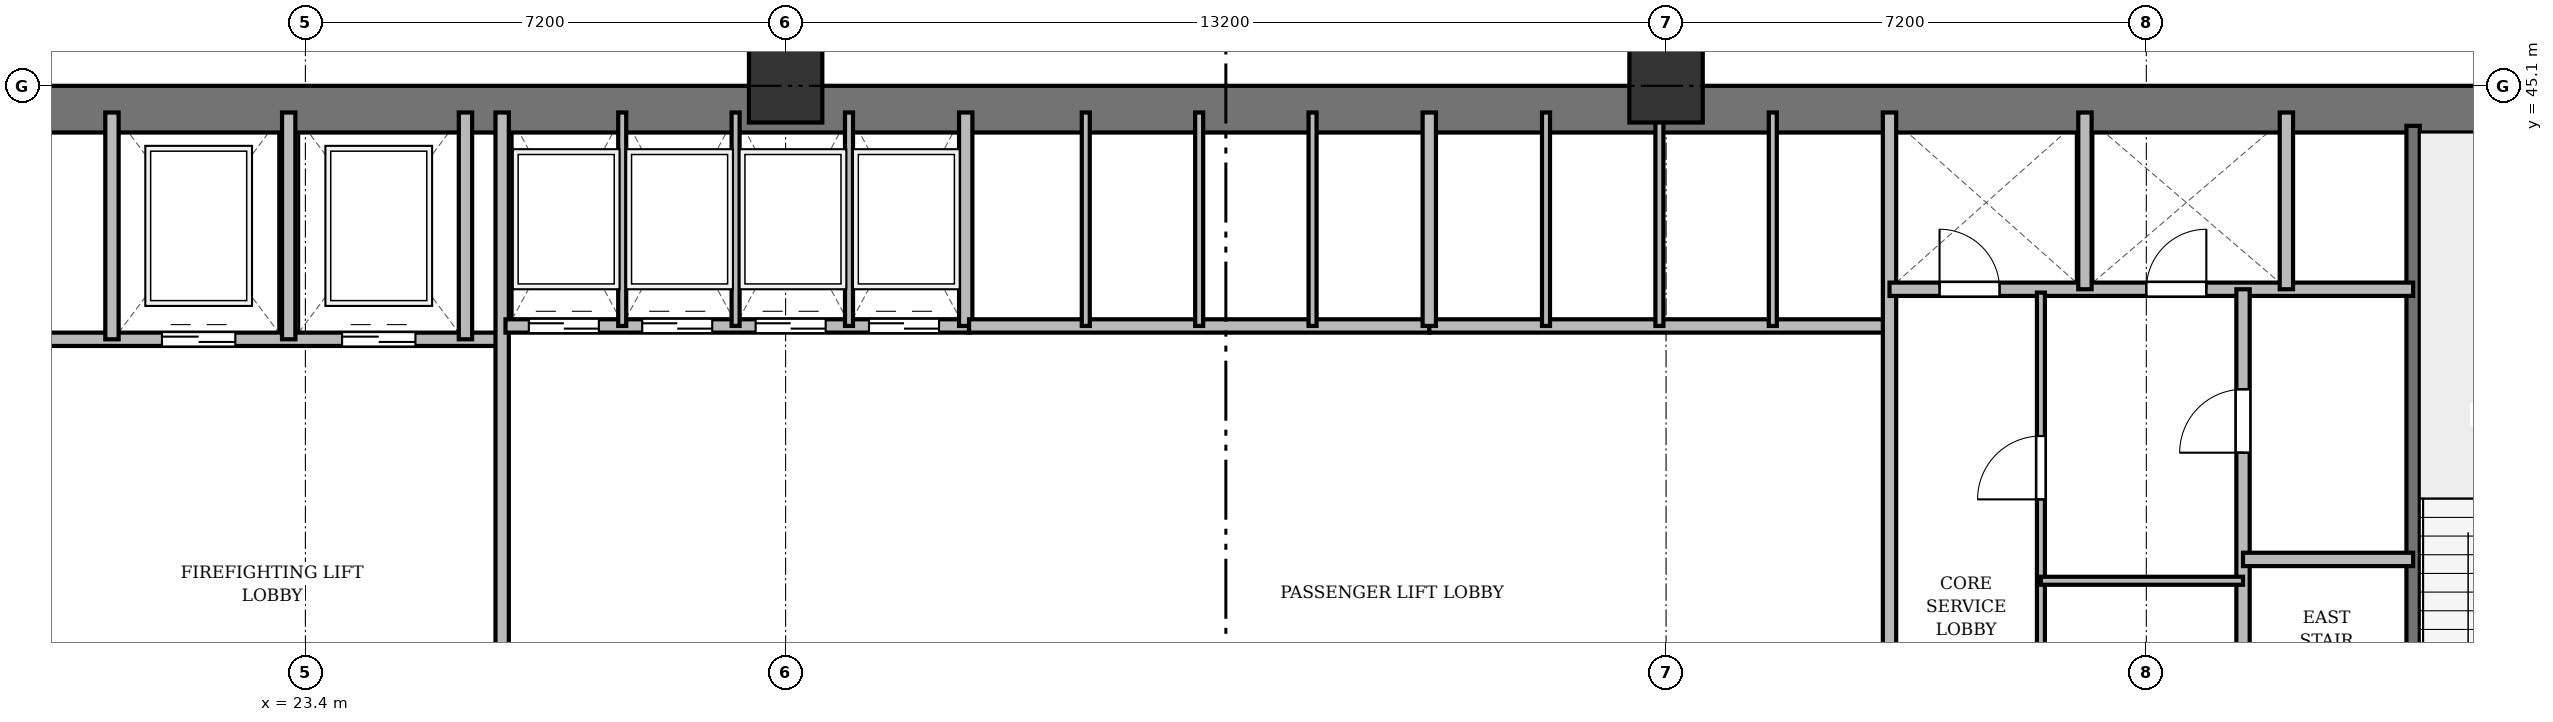
"""IFC4 building model, lengths in metres.
Left out: names, types, materials, properties, quantities, classifications, styles, units other than length and angle.
Written with IfcOpenShell. Run it as: python <this file> out.ifc"""

import sys

from ifc_helpers import new_model, si_unit, direction, frame, frame_2d, origin, origin_2d, place, context, subcontext, project, spatial, rectangle, extrude, source, transform, mapped, element, fill, save


model = new_model("IFC4")
c1 = context("Model", 3, precision=1e-05, world=origin(), true_north=direction((0.0, 1.0)))
c2 = subcontext(c1, "Body", "Model", "MODEL_VIEW")
j1 = project(units=[si_unit("LENGTHUNIT", "METRE"), si_unit("PLANEANGLEUNIT", "RADIAN")], contexts=[c1])
p1 = place(None, origin())
s1 = spatial("IfcSite", under=j1, at=p1, CompositionType="ELEMENT")
p2 = place(p1, origin())
s2 = spatial("IfcBuilding", under=s1, at=p2, CompositionType="ELEMENT")
p3 = place(p2, frame((0.0, 0.0, 9.7)))
s3 = spatial("IfcBuildingStorey", under=s2, at=p3, CompositionType="ELEMENT", Elevation=9.7)
m1 = source(origin(), c2, "Body", "SweptSolid", [
    extrude(rectangle(XDim=1.1, YDim=1.1, at=origin_2d()), origin(), (0.0, 0.0, 1.0), 4.5),
])
for number, where, z_axis, x_axis in (
    (1, (30.6, 45.1, 0.0), (0.0, 0.0, 1.0), (1.0, 0.0, 0.0)),
    (2, (43.8, 45.1, 0.0), (0.0, 0.0, 1.0), (1.0, 0.0, 0.0)),
):
    element("IfcColumn", number, at=place(p3, frame(where, z_axis=z_axis, x_axis=x_axis)), inside=s3, PredefinedType="COLUMN", context=c2, shape_type="MappedRepresentation", body=[
        mapped(m1, transform((0.0, 0.0, 0.0), x_axis=(1.0, 0.0, 0.0), y_axis=(0.0, 1.0, 0.0), z_axis=(0.0, 0.0, 1.0), scale=1.0)),
    ])
p4 = place(p3, frame((15.5, 44.75, 0.0), z_axis=(0.0, 0.0, 1.0), x_axis=(1.0, 0.0, 0.0)))
e3 = element("IfcWall", 3, at=p4, inside=s3, PredefinedType="SHEAR", context=c2, shape_type="SweptSolid", body=[
    extrude(rectangle(XDim=43.4, YDim=0.7, at=frame_2d((21.7, 0.0))), origin(), (0.0, 0.0, 1.0), 4.2),
])
p5 = place(p3, frame((55.0, 33.4, 0.0), z_axis=(0.0, 0.0, 1.0), x_axis=(0.0, 1.0, 0.0)))
e4 = element("IfcWall", 4, at=p5, inside=s3, PredefinedType="SHEAR", context=c2, shape_type="SweptSolid", body=[
    extrude(rectangle(XDim=11.1, YDim=0.2, at=frame_2d((5.55, 0.0))), origin(), (0.0, 0.0, 1.0), 4.2),
])
p6 = place(p5, frame((0.85, 0.0, 0.0)))
e5 = element("IfcOpeningElement", 5, at=p6, cuts=e4, PredefinedType="OPENING", context=c2, shape_type="SweptSolid", body=[
    extrude(rectangle(XDim=1.1, YDim=2.15, at=frame_2d((0.55, 1.075))), frame((0.0, 0.11, 0.0), z_axis=(0.0, -1.0, 0.0), x_axis=(1.0, 0.0, 0.0)), (0.0, 0.0, 1.0), 0.22),
])
p7 = place(p3, frame((19.55, 41.3, 0.0), z_axis=(0.0, 0.0, 1.0), x_axis=(1.0, 0.0, 0.0)))
e6 = element("IfcWall", 6, at=p7, inside=s3, PredefinedType="SOLIDWALL", context=c2, shape_type="SweptSolid", body=[
    extrude(rectangle(XDim=6.75, YDim=0.2, at=frame_2d((3.375, 0.0))), origin(), (0.0, 0.0, 1.0), 4.2),
])
p8 = place(p7, frame((1.7, 0.0, 0.0)))
e7 = element("IfcOpeningElement", 7, at=p8, cuts=e6, PredefinedType="OPENING", context=c2, shape_type="SweptSolid", body=[
    extrude(rectangle(XDim=1.1, YDim=2.15, at=frame_2d((0.55, 1.075))), frame((0.0, 0.11, 0.0), z_axis=(0.0, -1.0, 0.0), x_axis=(1.0, 0.0, 0.0)), (0.0, 0.0, 1.0), 0.22),
])
p9 = place(p7, frame((4.4, 0.0, 0.0)))
e8 = element("IfcOpeningElement", 8, at=p9, cuts=e6, PredefinedType="OPENING", context=c2, shape_type="SweptSolid", body=[
    extrude(rectangle(XDim=1.1, YDim=2.15, at=frame_2d((0.55, 1.075))), frame((0.0, 0.11, 0.0), z_axis=(0.0, -1.0, 0.0), x_axis=(1.0, 0.0, 0.0)), (0.0, 0.0, 1.0), 0.22),
])
for number, where, z_axis, x_axis in (
    (9, (20.5, 41.3, 0.0), (0.0, 0.0, 1.0), (0.0, 1.0, 0.0)),
    (10, (23.15, 41.3, 0.0), (0.0, 0.0, 1.0), (0.0, 1.0, 0.0)),
    (11, (25.8, 41.3, 0.0), (0.0, 0.0, 1.0), (0.0, 1.0, 0.0)),
):
    element("IfcWall", number, at=place(p3, frame(where, z_axis=z_axis, x_axis=x_axis)), inside=s3, PredefinedType="SOLIDWALL", context=c2, shape_type="SweptSolid", body=[
        extrude(rectangle(XDim=3.4, YDim=0.2, at=frame_2d((1.7, 0.0))), origin(), (0.0, 0.0, 1.0), 4.2),
    ])
p10 = place(p3, frame((26.35, 33.4, 0.0), z_axis=(0.0, 0.0, 1.0), x_axis=(0.0, 1.0, 0.0)))
e12 = element("IfcWall", 12, at=p10, inside=s3, PredefinedType="SOLIDWALL", context=c2, shape_type="SweptSolid", body=[
    extrude(rectangle(XDim=11.3, YDim=0.2, at=frame_2d((5.65, 0.0))), origin(), (0.0, 0.0, 1.0), 3.1),
])
p11 = place(p3, frame((26.4, 41.5, 0.0), z_axis=(0.0, 0.0, 1.0), x_axis=(1.0, 0.0, 0.0)))
e13 = element("IfcWall", 13, at=p11, inside=s3, PredefinedType="SOLIDWALL", context=c2, shape_type="SweptSolid", body=[
    extrude(rectangle(XDim=6.95, YDim=0.2, at=frame_2d((3.475, 0.0))), origin(), (0.0, 0.0, 1.0), 4.2),
])
p12 = place(p11, frame((0.35, 0.0, 0.0)))
e14 = element("IfcOpeningElement", 14, at=p12, cuts=e13, PredefinedType="OPENING", context=c2, shape_type="SweptSolid", body=[
    extrude(rectangle(XDim=1.05, YDim=2.15, at=frame_2d((0.525, 1.075))), frame((0.0, 0.11, 0.0), z_axis=(0.0, -1.0, 0.0), x_axis=(1.0, 0.0, 0.0)), (0.0, 0.0, 1.0), 0.22),
])
p13 = place(p11, frame((2.05, 0.0, 0.0)))
e15 = element("IfcOpeningElement", 15, at=p13, cuts=e13, PredefinedType="OPENING", context=c2, shape_type="SweptSolid", body=[
    extrude(rectangle(XDim=1.05, YDim=2.15, at=frame_2d((0.525, 1.075))), frame((0.0, 0.11, 0.0), z_axis=(0.0, -1.0, 0.0), x_axis=(1.0, 0.0, 0.0)), (0.0, 0.0, 1.0), 0.22),
])
p14 = place(p11, frame((3.75, 0.0, 0.0)))
e16 = element("IfcOpeningElement", 16, at=p14, cuts=e13, PredefinedType="OPENING", context=c2, shape_type="SweptSolid", body=[
    extrude(rectangle(XDim=1.05, YDim=2.15, at=frame_2d((0.525, 1.075))), frame((0.0, 0.11, 0.0), z_axis=(0.0, -1.0, 0.0), x_axis=(1.0, 0.0, 0.0)), (0.0, 0.0, 1.0), 0.22),
])
p15 = place(p11, frame((5.45, 0.0, 0.0)))
e17 = element("IfcOpeningElement", 17, at=p15, cuts=e13, PredefinedType="OPENING", context=c2, shape_type="SweptSolid", body=[
    extrude(rectangle(XDim=1.05, YDim=2.15, at=frame_2d((0.525, 1.075))), frame((0.0, 0.11, 0.0), z_axis=(0.0, -1.0, 0.0), x_axis=(1.0, 0.0, 0.0)), (0.0, 0.0, 1.0), 0.22),
])
p16 = place(p3, frame((33.3, 41.5, 0.0), z_axis=(0.0, 0.0, 1.0), x_axis=(0.0, 1.0, 0.0)))
e18 = element("IfcWall", 18, at=p16, inside=s3, PredefinedType="SOLIDWALL", context=c2, shape_type="SweptSolid", body=[
    extrude(rectangle(XDim=3.2, YDim=0.2, at=frame_2d((1.6, 0.0))), origin(), (0.0, 0.0, 1.0), 4.2),
])
for number, where, z_axis, x_axis in (
    (19, (28.15, 41.5, 0.0), (0.0, 0.0, 1.0), (0.0, 1.0, 0.0)),
    (20, (29.85, 41.5, 0.0), (0.0, 0.0, 1.0), (0.0, 1.0, 0.0)),
    (21, (31.55, 41.5, 0.0), (0.0, 0.0, 1.0), (0.0, 1.0, 0.0)),
):
    element("IfcWall", number, at=place(p3, frame(where, z_axis=z_axis, x_axis=x_axis)), inside=s3, PredefinedType="PARTITIONING", context=c2, shape_type="SweptSolid", body=[
        extrude(rectangle(XDim=3.2, YDim=0.12, at=frame_2d((1.6, 0.0))), origin(), (0.0, 0.0, 1.0), 4.2),
    ])
p17 = place(p3, frame((33.35, 41.5, 0.0), z_axis=(0.0, 0.0, 1.0), x_axis=(1.0, 0.0, 0.0)))
e22 = element("IfcWall", 22, at=p17, inside=s3, PredefinedType="SOLIDWALL", context=c2, shape_type="SweptSolid", body=[
    extrude(rectangle(XDim=6.9, YDim=0.2, at=frame_2d((3.45, 0.0))), origin(), (0.0, 0.0, 1.0), 4.2),
])
for number, where, z_axis, x_axis in (
    (23, (35.1, 41.5, 0.0), (0.0, 0.0, 1.0), (0.0, 1.0, 0.0)),
    (24, (36.8, 41.5, 0.0), (0.0, 0.0, 1.0), (0.0, 1.0, 0.0)),
    (25, (38.5, 41.5, 0.0), (0.0, 0.0, 1.0), (0.0, 1.0, 0.0)),
):
    element("IfcWall", number, at=place(p3, frame(where, z_axis=z_axis, x_axis=x_axis)), inside=s3, PredefinedType="PARTITIONING", context=c2, shape_type="SweptSolid", body=[
        extrude(rectangle(XDim=3.2, YDim=0.12, at=frame_2d((1.6, 0.0))), origin(), (0.0, 0.0, 1.0), 4.2),
    ])
p18 = place(p3, frame((40.25, 41.5, 0.0), z_axis=(0.0, 0.0, 1.0), x_axis=(1.0, 0.0, 0.0)))
e26 = element("IfcWall", 26, at=p18, inside=s3, PredefinedType="SOLIDWALL", context=c2, shape_type="SweptSolid", body=[
    extrude(rectangle(XDim=6.9, YDim=0.2, at=frame_2d((3.45, 0.0))), origin(), (0.0, 0.0, 1.0), 3.4),
])
p19 = place(p3, frame((40.25, 41.5, 0.0), z_axis=(0.0, 0.0, 1.0), x_axis=(0.0, 1.0, 0.0)))
e27 = element("IfcWall", 27, at=p19, inside=s3, PredefinedType="SOLIDWALL", context=c2, shape_type="SweptSolid", body=[
    extrude(rectangle(XDim=3.2, YDim=0.2, at=frame_2d((1.6, 0.0))), origin(), (0.0, 0.0, 1.0), 4.2),
])
p20 = place(p3, frame((42.0, 41.5, 0.0), z_axis=(0.0, 0.0, 1.0), x_axis=(0.0, 1.0, 0.0)))
e28 = element("IfcWall", 28, at=p20, inside=s3, PredefinedType="PARTITIONING", context=c2, shape_type="SweptSolid", body=[
    extrude(rectangle(XDim=3.2, YDim=0.12, at=frame_2d((1.6, 0.0))), origin(), (0.0, 0.0, 1.0), 4.2),
])
p21 = place(p3, frame((43.7, 41.5, 0.0), z_axis=(0.0, 0.0, 1.0), x_axis=(0.0, 1.0, 0.0)))
e29 = element("IfcWall", 29, at=p21, inside=s3, PredefinedType="PARTITIONING", context=c2, shape_type="SweptSolid", body=[
    extrude(rectangle(XDim=3.2, YDim=0.12, at=frame_2d((1.6, 0.0))), origin(), (0.0, 0.0, 1.0), 3.4),
])
p22 = place(p3, frame((45.4, 41.5, 0.0), z_axis=(0.0, 0.0, 1.0), x_axis=(0.0, 1.0, 0.0)))
e30 = element("IfcWall", 30, at=p22, inside=s3, PredefinedType="PARTITIONING", context=c2, shape_type="SweptSolid", body=[
    extrude(rectangle(XDim=3.2, YDim=0.12, at=frame_2d((1.6, 0.0))), origin(), (0.0, 0.0, 1.0), 4.2),
])
p23 = place(p3, frame((47.15, 33.4, 0.0), z_axis=(0.0, 0.0, 1.0), x_axis=(0.0, 1.0, 0.0)))
e31 = element("IfcWall", 31, at=p23, inside=s3, PredefinedType="SOLIDWALL", context=c2, shape_type="SweptSolid", body=[
    extrude(rectangle(XDim=11.3, YDim=0.2, at=frame_2d((5.65, 0.0))), origin(), (0.0, 0.0, 1.0), 3.1),
])
p24 = place(p3, frame((47.15, 42.05, 0.0), z_axis=(0.0, 0.0, 1.0), x_axis=(1.0, 0.0, 0.0)))
e32 = element("IfcWall", 32, at=p24, inside=s3, PredefinedType="SOLIDWALL", context=c2, shape_type="SweptSolid", body=[
    extrude(rectangle(XDim=7.85, YDim=0.2, at=frame_2d((3.925, 0.0))), origin(), (0.0, 0.0, 1.0), 4.2),
])
p25 = place(p24, frame((0.75, 0.0, 0.0)))
e33 = element("IfcOpeningElement", 33, at=p25, cuts=e32, PredefinedType="OPENING", context=c2, shape_type="SweptSolid", body=[
    extrude(rectangle(XDim=0.9, YDim=2.1, at=frame_2d((0.45, 1.05))), frame((0.0, 0.11, 0.0), z_axis=(0.0, -1.0, 0.0), x_axis=(1.0, 0.0, 0.0)), (0.0, 0.0, 1.0), 0.22),
])
p26 = place(p24, frame((3.85, 0.0, 0.0)))
e34 = element("IfcOpeningElement", 34, at=p26, cuts=e32, PredefinedType="OPENING", context=c2, shape_type="SweptSolid", body=[
    extrude(rectangle(XDim=0.9, YDim=2.1, at=frame_2d((0.45, 1.05))), frame((0.0, 0.11, 0.0), z_axis=(0.0, -1.0, 0.0), x_axis=(1.0, 0.0, 0.0)), (0.0, 0.0, 1.0), 0.22),
])
for number, where, z_axis, x_axis in (
    (35, (50.08, 42.05, 0.0), (0.0, 0.0, 1.0), (0.0, 1.0, 0.0)),
    (36, (53.1, 42.05, 0.0), (0.0, 0.0, 1.0), (0.0, 1.0, 0.0)),
):
    element("IfcWall", number, at=place(p3, frame(where, z_axis=z_axis, x_axis=x_axis)), inside=s3, PredefinedType="SOLIDWALL", context=c2, shape_type="SweptSolid", body=[
        extrude(rectangle(XDim=2.65, YDim=0.2, at=frame_2d((1.325, 0.0))), origin(), (0.0, 0.0, 1.0), 4.2),
    ])
p27 = place(p3, frame((52.45, 33.4, 0.0), z_axis=(0.0, 0.0, 1.0), x_axis=(0.0, 1.0, 0.0)))
e37 = element("IfcWall", 37, at=p27, inside=s3, PredefinedType="PARTITIONING", context=c2, shape_type="SweptSolid", body=[
    extrude(rectangle(XDim=8.65, YDim=0.2, at=frame_2d((4.325, 0.0))), origin(), (0.0, 0.0, 1.0), 3.1),
])
p28 = place(p27, frame((6.2, 0.0, 0.0)))
e38 = element("IfcOpeningElement", 38, at=p28, cuts=e37, PredefinedType="OPENING", context=c2, shape_type="SweptSolid", body=[
    extrude(rectangle(XDim=0.95, YDim=2.15, at=frame_2d((0.475, 1.075))), frame((0.0, 0.11, 0.0), z_axis=(0.0, -1.0, 0.0), x_axis=(1.0, 0.0, 0.0)), (0.0, 0.0, 1.0), 0.22),
])
p29 = place(p3, frame((52.45, 38.0, 0.0), z_axis=(0.0, 0.0, 1.0), x_axis=(1.0, 0.0, 0.0)))
e39 = element("IfcWall", 39, at=p29, inside=s3, PredefinedType="PARTITIONING", context=c2, shape_type="SweptSolid", body=[
    extrude(rectangle(XDim=2.55, YDim=0.2, at=frame_2d((1.275, 0.0))), origin(), (0.0, 0.0, 1.0), 4.2),
])
p30 = place(p3, frame((49.42, 33.4, 0.0), z_axis=(0.0, 0.0, 1.0), x_axis=(0.0, 1.0, 0.0)))
e40 = element("IfcWall", 40, at=p30, inside=s3, PredefinedType="PARTITIONING", context=c2, shape_type="SweptSolid", body=[
    extrude(rectangle(XDim=8.6, YDim=0.12, at=frame_2d((4.3, 0.0))), origin(), (0.0, 0.0, 1.0), 3.1),
])
p31 = place(p30, frame((1.3, 0.0, 0.0)))
e41 = element("IfcOpeningElement", 41, at=p31, cuts=e40, PredefinedType="OPENING", context=c2, shape_type="SweptSolid", body=[
    extrude(rectangle(XDim=0.95, YDim=2.15, at=frame_2d((0.475, 1.075))), frame((0.0, 0.07, 0.0), z_axis=(0.0, -1.0, 0.0), x_axis=(1.0, 0.0, 0.0)), (0.0, 0.0, 1.0), 0.14),
])
p32 = place(p30, frame((5.5, 0.0, 0.0)))
e42 = element("IfcOpeningElement", 42, at=p32, cuts=e40, PredefinedType="OPENING", context=c2, shape_type="SweptSolid", body=[
    extrude(rectangle(XDim=0.95, YDim=2.15, at=frame_2d((0.475, 1.075))), frame((0.0, 0.07, 0.0), z_axis=(0.0, -1.0, 0.0), x_axis=(1.0, 0.0, 0.0)), (0.0, 0.0, 1.0), 0.14),
])
p33 = place(p3, frame((49.42, 37.68, 0.0), z_axis=(0.0, 0.0, 1.0), x_axis=(1.0, 0.0, 0.0)))
e43 = element("IfcWall", 43, at=p33, inside=s3, PredefinedType="PARTITIONING", context=c2, shape_type="SweptSolid", body=[
    extrude(rectangle(XDim=3.03, YDim=0.12, at=frame_2d((1.515, 0.0))), origin(), (0.0, 0.0, 1.0), 4.2),
])
m2 = source(origin(), c2, "Body", "SweptSolid", [
    extrude(rectangle(XDim=1.1, YDim=2.15, at=frame_2d((0.55, 1.075))), frame((0.0, 0.025, 0.0), z_axis=(0.0, -1.0, 0.0), x_axis=(1.0, 0.0, 0.0)), (0.0, 0.0, 1.0), 0.05),
])
p34 = place(p8, origin())
e44 = element("IfcDoor", 44, at=p34, inside=s3, OperationType="DOUBLE_DOOR_SLIDING", PredefinedType="DOOR", context=c2, shape_type="MappedRepresentation", body=[
    mapped(m2, transform((0.0, 0.0, 0.0), x_axis=(1.0, 0.0, 0.0), y_axis=(0.0, 1.0, 0.0), z_axis=(0.0, 0.0, 1.0), scale=1.0)),
])
fill(e7, e44)
p35 = place(p9, origin())
e45 = element("IfcDoor", 45, at=p35, inside=s3, OperationType="DOUBLE_DOOR_SLIDING", PredefinedType="DOOR", context=c2, shape_type="MappedRepresentation", body=[
    mapped(m2, transform((0.0, 0.0, 0.0), x_axis=(1.0, 0.0, 0.0), y_axis=(0.0, 1.0, 0.0), z_axis=(0.0, 0.0, 1.0), scale=1.0)),
])
fill(e8, e45)
m3 = source(origin(), c2, "Body", "SweptSolid", [
    extrude(rectangle(XDim=1.05, YDim=2.15, at=frame_2d((0.525, 1.075))), frame((0.0, 0.025, 0.0), z_axis=(0.0, -1.0, 0.0), x_axis=(1.0, 0.0, 0.0)), (0.0, 0.0, 1.0), 0.05),
])
p36 = place(p12, origin())
e46 = element("IfcDoor", 46, at=p36, inside=s3, OperationType="DOUBLE_DOOR_SLIDING", PredefinedType="DOOR", context=c2, shape_type="MappedRepresentation", body=[
    mapped(m3, transform((0.0, 0.0, 0.0), x_axis=(1.0, 0.0, 0.0), y_axis=(0.0, 1.0, 0.0), z_axis=(0.0, 0.0, 1.0), scale=1.0)),
])
fill(e14, e46)
p37 = place(p13, origin())
e47 = element("IfcDoor", 47, at=p37, inside=s3, OperationType="DOUBLE_DOOR_SLIDING", PredefinedType="DOOR", context=c2, shape_type="MappedRepresentation", body=[
    mapped(m3, transform((0.0, 0.0, 0.0), x_axis=(1.0, 0.0, 0.0), y_axis=(0.0, 1.0, 0.0), z_axis=(0.0, 0.0, 1.0), scale=1.0)),
])
fill(e15, e47)
p38 = place(p14, origin())
e48 = element("IfcDoor", 48, at=p38, inside=s3, OperationType="DOUBLE_DOOR_SLIDING", PredefinedType="DOOR", context=c2, shape_type="MappedRepresentation", body=[
    mapped(m3, transform((0.0, 0.0, 0.0), x_axis=(1.0, 0.0, 0.0), y_axis=(0.0, 1.0, 0.0), z_axis=(0.0, 0.0, 1.0), scale=1.0)),
])
fill(e16, e48)
p39 = place(p15, origin())
e49 = element("IfcDoor", 49, at=p39, inside=s3, OperationType="DOUBLE_DOOR_SLIDING", PredefinedType="DOOR", context=c2, shape_type="MappedRepresentation", body=[
    mapped(m3, transform((0.0, 0.0, 0.0), x_axis=(1.0, 0.0, 0.0), y_axis=(0.0, 1.0, 0.0), z_axis=(0.0, 0.0, 1.0), scale=1.0)),
])
fill(e17, e49)
m4 = source(origin(), c2, "Body", "SweptSolid", [
    extrude(rectangle(XDim=0.9, YDim=2.1, at=frame_2d((0.45, 1.05))), frame((0.0, 0.025, 0.0), z_axis=(0.0, -1.0, 0.0), x_axis=(1.0, 0.0, 0.0)), (0.0, 0.0, 1.0), 0.05),
])
p40 = place(p25, origin())
e50 = element("IfcDoor", 50, at=p40, inside=s3, OperationType="SINGLE_SWING_LEFT", PredefinedType="DOOR", context=c2, shape_type="MappedRepresentation", body=[
    mapped(m4, transform((0.0, 0.0, 0.0), x_axis=(1.0, 0.0, 0.0), y_axis=(0.0, 1.0, 0.0), z_axis=(0.0, 0.0, 1.0), scale=1.0)),
])
fill(e33, e50)
p41 = place(p26, origin())
e51 = element("IfcDoor", 51, at=p41, inside=s3, OperationType="SINGLE_SWING_RIGHT", PredefinedType="DOOR", context=c2, shape_type="MappedRepresentation", body=[
    mapped(m4, transform((0.0, 0.0, 0.0), x_axis=(1.0, 0.0, 0.0), y_axis=(0.0, 1.0, 0.0), z_axis=(0.0, 0.0, 1.0), scale=1.0)),
])
fill(e34, e51)
m5 = source(origin(), c2, "Body", "SweptSolid", [
    extrude(rectangle(XDim=0.95, YDim=2.15, at=frame_2d((0.475, 1.075))), frame((0.0, 0.025, 0.0), z_axis=(0.0, -1.0, 0.0), x_axis=(1.0, 0.0, 0.0)), (0.0, 0.0, 1.0), 0.05),
])
p42 = place(p28, origin())
e52 = element("IfcDoor", 52, at=p42, inside=s3, OperationType="SINGLE_SWING_LEFT", PredefinedType="DOOR", context=c2, shape_type="MappedRepresentation", body=[
    mapped(m5, transform((0.0, 0.0, 0.0), x_axis=(1.0, 0.0, 0.0), y_axis=(0.0, 1.0, 0.0), z_axis=(0.0, 0.0, 1.0), scale=1.0)),
])
fill(e38, e52)
p43 = place(p32, origin())
e53 = element("IfcDoor", 53, at=p43, inside=s3, OperationType="SINGLE_SWING_LEFT", PredefinedType="DOOR", context=c2, shape_type="MappedRepresentation", body=[
    mapped(m5, transform((0.0, 0.0, 0.0), x_axis=(1.0, 0.0, 0.0), y_axis=(0.0, 1.0, 0.0), z_axis=(0.0, 0.0, 1.0), scale=1.0)),
])
fill(e42, e53)
save(model, sys.argv[1])
